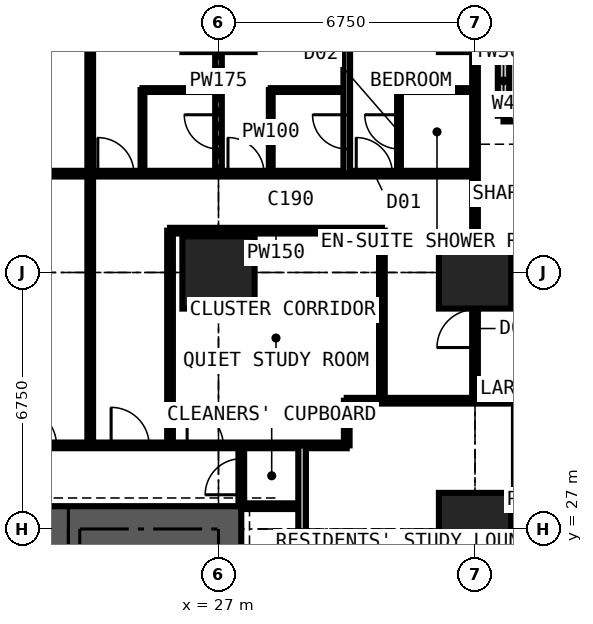
"""IFC4 building model, lengths in metres.
Left out: names, types, materials, properties, quantities, classifications, styles, units other than length and angle.
Written with IfcOpenShell. Run it as: python <this file> out.ifc"""

import sys

from ifc_helpers import new_model, si_unit, direction, frame, frame_2d, origin, origin_2d, place, context, subcontext, project, spatial, rectangle, extrude, element, fill, save


model = new_model("IFC4")
c1 = context("Model", 3, precision=1e-05, world=origin(), true_north=direction((0.0, 1.0)))
c2 = subcontext(c1, "Body", "Model", "MODEL_VIEW")
j1 = project(units=[si_unit("LENGTHUNIT", "METRE"), si_unit("PLANEANGLEUNIT", "RADIAN")], contexts=[c1])
p1 = place(None, origin())
s1 = spatial("IfcSite", under=j1, at=p1, CompositionType="ELEMENT")
p2 = place(p1, origin())
s2 = spatial("IfcBuilding", under=s1, at=p2, CompositionType="ELEMENT")
p3 = place(p2, frame((0.0, 0.0, 28.8)))
s3 = spatial("IfcBuildingStorey", under=s2, at=p3, CompositionType="ELEMENT", Elevation=28.8)
for number, where, z_axis, x_axis in (
    (1, (27.0, 33.75, 0.0), (0.0, 0.0, 1.0), (1.0, 0.0, 0.0)),
    (2, (33.75, 27.0, 0.0), (0.0, 0.0, 1.0), (1.0, 0.0, 0.0)),
    (3, (33.75, 33.75, 0.0), (0.0, 0.0, 1.0), (1.0, 0.0, 0.0)),
):
    element("IfcColumn", number, at=place(p3, frame(where, z_axis=z_axis, x_axis=x_axis)), inside=s3, PredefinedType="COLUMN", context=c2, shape_type="SweptSolid", body=[
        extrude(rectangle(XDim=1.9, YDim=1.9, at=origin_2d()), origin(), (0.0, 0.0, 1.0), 3.6),
    ])
p4 = place(p3, frame((27.6, 27.0, 0.0), z_axis=(0.0, 0.0, 1.0), x_axis=(-1.0, 0.0, 0.0)))
e4 = element("IfcWall", 4, at=p4, inside=s3, PredefinedType="SHEAR", context=c2, shape_type="SweptSolid", body=[
    extrude(rectangle(XDim=14.7, YDim=1.2, at=frame_2d((7.35, 0.0))), origin(), (0.0, 0.0, 1.0), 3.6),
])
p5 = place(p4, frame((4.55, 0.0, 0.0)))
e5 = element("IfcOpeningElement", 5, at=p5, cuts=e4, PredefinedType="OPENING", context=c2, shape_type="SweptSolid", body=[
    extrude(rectangle(XDim=0.9, YDim=2.2, at=frame_2d((0.45, 1.1))), frame((0.0, 0.61, 0.0), z_axis=(0.0, -1.0, 0.0), x_axis=(1.0, 0.0, 0.0)), (0.0, 0.0, 1.0), 1.22),
])
p6 = place(p4, frame((7.525, 0.0, 0.0)))
e6 = element("IfcOpeningElement", 6, at=p6, cuts=e4, PredefinedType="OPENING", context=c2, shape_type="SweptSolid", body=[
    extrude(rectangle(XDim=1.0, YDim=2.2, at=frame_2d((0.5, 1.1))), frame((0.0, 0.61, 0.0), z_axis=(0.0, -1.0, 0.0), x_axis=(1.0, 0.0, 0.0)), (0.0, 0.0, 1.0), 1.22),
])
p7 = place(p3, frame((37.875, 37.875, 0.0), z_axis=(0.0, 0.0, 1.0), x_axis=(-1.0, 0.0, 0.0)))
e7 = element("IfcWall", 7, at=p7, inside=s3, PredefinedType="SOLIDWALL", context=c2, shape_type="SweptSolid", body=[
    extrude(rectangle(XDim=3.375, YDim=0.3, at=frame_2d((1.688, 0.0))), origin(), (0.0, 0.0, 1.0), 3.375),
])
p8 = place(p7, frame((0.788, 0.0, 0.6)))
e8 = element("IfcOpeningElement", 8, at=p8, cuts=e7, PredefinedType="OPENING", context=c2, shape_type="SweptSolid", body=[
    extrude(rectangle(XDim=1.8, YDim=2.1, at=frame_2d((0.9, 1.05))), frame((0.0, 0.16, 0.0), z_axis=(0.0, -1.0, 0.0), x_axis=(1.0, 0.0, 0.0)), (0.0, 0.0, 1.0), 0.32),
])
p9 = place(p3, frame((34.5, 37.875, 0.0), z_axis=(0.0, 0.0, 1.0), x_axis=(0.0, 1.0, 0.0)))
e9 = element("IfcWall", 9, at=p9, inside=s3, PredefinedType="SOLIDWALL", context=c2, shape_type="SweptSolid", body=[
    extrude(rectangle(XDim=3.375, YDim=0.3, at=frame_2d((1.688, 0.0))), origin(), (0.0, 0.0, 1.0), 3.375),
])
p10 = place(p9, frame((0.317, 0.0, 0.9)))
e10 = element("IfcOpeningElement", 10, at=p10, cuts=e9, PredefinedType="OPENING", context=c2, shape_type="SweptSolid", body=[
    extrude(rectangle(XDim=1.2, YDim=1.8, at=frame_2d((0.6, 0.9))), frame((0.0, 0.16, 0.0), z_axis=(0.0, -1.0, 0.0), x_axis=(1.0, 0.0, 0.0)), (0.0, 0.0, 1.0), 0.32),
])
p11 = place(p3, frame((10.125, 36.35, 0.0), z_axis=(0.0, 0.0, 1.0), x_axis=(1.0, 0.0, 0.0)))
e11 = element("IfcWall", 11, at=p11, inside=s3, PredefinedType="PARTITIONING", context=c2, shape_type="SweptSolid", body=[
    extrude(rectangle(XDim=23.625, YDim=0.15, at=frame_2d((11.812, 0.0))), origin(), (0.0, 0.0, 1.0), 3.375),
])
p12 = place(p11, frame((20.5, 0.0, 0.0)))
e12 = element("IfcOpeningElement", 12, at=p12, cuts=e11, PredefinedType="OPENING", context=c2, shape_type="SweptSolid", body=[
    extrude(rectangle(XDim=0.95, YDim=2.2, at=frame_2d((0.475, 1.1))), frame((0.0, 0.085, 0.0), z_axis=(0.0, -1.0, 0.0), x_axis=(1.0, 0.0, 0.0)), (0.0, 0.0, 1.0), 0.17),
])
p13 = place(p11, frame((17.125, 0.0, 0.0)))
e13 = element("IfcOpeningElement", 13, at=p13, cuts=e11, PredefinedType="OPENING", context=c2, shape_type="SweptSolid", body=[
    extrude(rectangle(XDim=0.95, YDim=2.2, at=frame_2d((0.475, 1.1))), frame((0.0, 0.085, 0.0), z_axis=(0.0, -1.0, 0.0), x_axis=(1.0, 0.0, 0.0)), (0.0, 0.0, 1.0), 0.17),
])
p14 = place(p11, frame((13.7, 0.0, 0.0)))
e14 = element("IfcOpeningElement", 14, at=p14, cuts=e11, PredefinedType="OPENING", context=c2, shape_type="SweptSolid", body=[
    extrude(rectangle(XDim=0.95, YDim=2.2, at=frame_2d((0.475, 1.1))), frame((0.0, 0.085, 0.0), z_axis=(0.0, -1.0, 0.0), x_axis=(1.0, 0.0, 0.0)), (0.0, 0.0, 1.0), 0.17),
])
p15 = place(p11, frame((4.2, 0.0, 0.0)))
e15 = element("IfcOpeningElement", 15, at=p15, cuts=e11, PredefinedType="OPENING", context=c2, shape_type="SweptSolid", body=[
    extrude(rectangle(XDim=0.95, YDim=2.2, at=frame_2d((0.475, 1.1))), frame((0.0, 0.085, 0.0), z_axis=(0.0, -1.0, 0.0), x_axis=(1.0, 0.0, 0.0)), (0.0, 0.0, 1.0), 0.17),
])
p16 = place(p11, frame((10.95, 0.0, 0.0)))
e16 = element("IfcOpeningElement", 16, at=p16, cuts=e11, PredefinedType="OPENING", context=c2, shape_type="SweptSolid", body=[
    extrude(rectangle(XDim=0.95, YDim=2.2, at=frame_2d((0.475, 1.1))), frame((0.0, 0.085, 0.0), z_axis=(0.0, -1.0, 0.0), x_axis=(1.0, 0.0, 0.0)), (0.0, 0.0, 1.0), 0.17),
])
p17 = place(p3, frame((11.3, 29.2, 0.0), z_axis=(0.0, 0.0, 1.0), x_axis=(1.0, 0.0, 0.0)))
e17 = element("IfcWall", 17, at=p17, inside=s3, PredefinedType="PARTITIONING", context=c2, shape_type="SweptSolid", body=[
    extrude(rectangle(XDim=19.075, YDim=0.15, at=frame_2d((9.538, 0.0))), origin(), (0.0, 0.0, 1.0), 3.375),
])
p18 = place(p17, frame((12.875, 0.0, 0.0)))
e18 = element("IfcOpeningElement", 18, at=p18, cuts=e17, PredefinedType="OPENING", context=c2, shape_type="SweptSolid", body=[
    extrude(rectangle(XDim=1.0, YDim=2.2, at=frame_2d((0.5, 1.1))), frame((0.0, 0.085, 0.0), z_axis=(0.0, -1.0, 0.0), x_axis=(1.0, 0.0, 0.0)), (0.0, 0.0, 1.0), 0.17),
])
p19 = place(p17, frame((10.438, 0.0, 0.0)))
e19 = element("IfcOpeningElement", 19, at=p19, cuts=e17, PredefinedType="OPENING", context=c2, shape_type="SweptSolid", body=[
    extrude(rectangle(XDim=1.0, YDim=2.2, at=frame_2d((0.5, 1.1))), frame((0.0, 0.085, 0.0), z_axis=(0.0, -1.0, 0.0), x_axis=(1.0, 0.0, 0.0)), (0.0, 0.0, 1.0), 0.17),
])
p20 = place(p17, frame((14.875, 0.0, 0.0)))
e20 = element("IfcOpeningElement", 20, at=p20, cuts=e17, PredefinedType="OPENING", context=c2, shape_type="SweptSolid", body=[
    extrude(rectangle(XDim=0.95, YDim=2.2, at=frame_2d((0.475, 1.1))), frame((0.0, 0.085, 0.0), z_axis=(0.0, -1.0, 0.0), x_axis=(1.0, 0.0, 0.0)), (0.0, 0.0, 1.0), 0.17),
])
p21 = place(p3, frame((23.625, 29.2, 0.0), z_axis=(0.0, 0.0, 1.0), x_axis=(0.0, 1.0, 0.0)))
e21 = element("IfcWall", 21, at=p21, inside=s3, PredefinedType="PARTITIONING", context=c2, shape_type="SweptSolid", body=[
    extrude(rectangle(XDim=12.034, YDim=0.15, at=frame_2d((6.017, 0.0))), origin(), (0.0, 0.0, 1.0), 3.375),
])
p22 = place(p3, frame((25.0, 36.35, 0.0), z_axis=(0.0, 0.0, 1.0), x_axis=(0.0, 1.0, 0.0)))
e22 = element("IfcWall", 22, at=p22, inside=s3, PredefinedType="PARTITIONING", context=c2, shape_type="SweptSolid", body=[
    extrude(rectangle(XDim=2.2, YDim=0.1, at=frame_2d((1.1, 0.0))), origin(), (0.0, 0.0, 1.0), 3.375),
])
p23 = place(p3, frame((25.0, 38.55, 0.0), z_axis=(0.0, 0.0, 1.0), x_axis=(1.0, 0.0, 0.0)))
e23 = element("IfcWall", 23, at=p23, inside=s3, PredefinedType="PARTITIONING", context=c2, shape_type="SweptSolid", body=[
    extrude(rectangle(XDim=2.0, YDim=0.1, at=frame_2d((1.0, 0.0))), origin(), (0.0, 0.0, 1.0), 3.375),
])
p24 = place(p3, frame((25.725, 29.2, 0.0), z_axis=(0.0, 0.0, 1.0), x_axis=(0.0, 1.0, 0.0)))
e24 = element("IfcWall", 24, at=p24, inside=s3, PredefinedType="PARTITIONING", context=c2, shape_type="SweptSolid", body=[
    extrude(rectangle(XDim=5.65, YDim=0.15, at=frame_2d((2.825, 0.0))), origin(), (0.0, 0.0, 1.0), 3.375),
])
p25 = place(p3, frame((25.725, 34.85, 0.0), z_axis=(0.0, 0.0, 1.0), x_axis=(1.0, 0.0, 0.0)))
e25 = element("IfcWall", 25, at=p25, inside=s3, PredefinedType="PARTITIONING", context=c2, shape_type="SweptSolid", body=[
    extrude(rectangle(XDim=5.575, YDim=0.15, at=frame_2d((2.788, 0.0))), origin(), (0.0, 0.0, 1.0), 3.375),
])
p26 = place(p3, frame((27.0, 36.35, 0.0), z_axis=(0.0, 0.0, 1.0), x_axis=(0.0, 1.0, 0.0)))
e26 = element("IfcWall", 26, at=p26, inside=s3, PredefinedType="PARTITIONING", context=c2, shape_type="SweptSolid", body=[
    extrude(rectangle(XDim=4.884, YDim=0.175, at=frame_2d((2.442, 0.0))), origin(), (0.0, 0.0, 1.0), 2.877),
])
p27 = place(p26, frame((0.65, 0.0, 0.0)))
e27 = element("IfcOpeningElement", 27, at=p27, cuts=e26, PredefinedType="OPENING", context=c2, shape_type="SweptSolid", body=[
    extrude(rectangle(XDim=0.9, YDim=2.2, at=frame_2d((0.45, 1.1))), frame((0.0, 0.097, 0.0), z_axis=(0.0, -1.0, 0.0), x_axis=(1.0, 0.0, 0.0)), (0.0, 0.0, 1.0), 0.195),
])
p28 = place(p3, frame((27.6, 27.6, 0.0), z_axis=(0.0, 0.0, 1.0), x_axis=(0.0, 1.0, 0.0)))
e28 = element("IfcWall", 28, at=p28, inside=s3, PredefinedType="PARTITIONING", context=c2, shape_type="SweptSolid", body=[
    extrude(rectangle(XDim=1.6, YDim=0.15, at=frame_2d((0.8, 0.0))), origin(), (0.0, 0.0, 1.0), 3.375),
])
p29 = place(p28, frame((0.3, 0.0, 0.0)))
e29 = element("IfcOpeningElement", 29, at=p29, cuts=e28, PredefinedType="OPENING", context=c2, shape_type="SweptSolid", body=[
    extrude(rectangle(XDim=0.95, YDim=2.2, at=frame_2d((0.475, 1.1))), frame((0.0, 0.085, 0.0), z_axis=(0.0, -1.0, 0.0), x_axis=(1.0, 0.0, 0.0)), (0.0, 0.0, 1.0), 0.17),
])
p30 = place(p3, frame((27.6, 27.6, 0.0), z_axis=(0.0, 0.0, 1.0), x_axis=(1.0, 0.0, 0.0)))
e30 = element("IfcWall", 30, at=p30, inside=s3, PredefinedType="PARTITIONING", context=c2, shape_type="SweptSolid", body=[
    extrude(rectangle(XDim=1.6, YDim=0.15, at=frame_2d((0.8, 0.0))), origin(), (0.0, 0.0, 1.0), 2.877),
])
p31 = place(p3, frame((28.375, 36.35, 0.0), z_axis=(0.0, 0.0, 1.0), x_axis=(0.0, 1.0, 0.0)))
e31 = element("IfcWall", 31, at=p31, inside=s3, PredefinedType="PARTITIONING", context=c2, shape_type="SweptSolid", body=[
    extrude(rectangle(XDim=2.2, YDim=0.1, at=frame_2d((1.1, 0.0))), origin(), (0.0, 0.0, 1.0), 3.375),
])
p32 = place(p3, frame((28.375, 38.55, 0.0), z_axis=(0.0, 0.0, 1.0), x_axis=(1.0, 0.0, 0.0)))
e32 = element("IfcWall", 32, at=p32, inside=s3, PredefinedType="PARTITIONING", context=c2, shape_type="SweptSolid", body=[
    extrude(rectangle(XDim=2.0, YDim=0.1, at=frame_2d((1.0, 0.0))), origin(), (0.0, 0.0, 1.0), 3.375),
])
p33 = place(p3, frame((29.2, 11.3, 0.0), z_axis=(0.0, 0.0, 1.0), x_axis=(0.0, 1.0, 0.0)))
e33 = element("IfcWall", 33, at=p33, inside=s3, PredefinedType="PARTITIONING", context=c2, shape_type="SweptSolid", body=[
    extrude(rectangle(XDim=17.9, YDim=0.2, at=frame_2d((8.95, 0.0))), origin(), (0.0, 0.0, 1.0), 3.375),
])
p34 = place(p33, frame((8.35, 0.0, 0.0)))
e34 = element("IfcOpeningElement", 34, at=p34, cuts=e33, PredefinedType="OPENING", context=c2, shape_type="SweptSolid", body=[
    extrude(rectangle(XDim=1.2, YDim=2.2, at=frame_2d((0.6, 1.1))), frame((0.0, 0.11, 0.0), z_axis=(0.0, -1.0, 0.0), x_axis=(1.0, 0.0, 0.0)), (0.0, 0.0, 1.0), 0.22),
])
p35 = place(p3, frame((30.375, 29.2, 0.0), z_axis=(0.0, 0.0, 1.0), x_axis=(0.0, 1.0, 0.0)))
e35 = element("IfcWall", 35, at=p35, inside=s3, PredefinedType="PARTITIONING", context=c2, shape_type="SweptSolid", body=[
    extrude(rectangle(XDim=1.175, YDim=0.15, at=frame_2d((0.587, 0.0))), origin(), (0.0, 0.0, 1.0), 3.375),
])
p36 = place(p3, frame((30.375, 30.375, 0.0), z_axis=(0.0, 0.0, 1.0), x_axis=(1.0, 0.0, 0.0)))
e36 = element("IfcWall", 36, at=p36, inside=s3, PredefinedType="PARTITIONING", context=c2, shape_type="SweptSolid", body=[
    extrude(rectangle(XDim=10.859, YDim=0.15, at=frame_2d((5.429, 0.0))), origin(), (0.0, 0.0, 1.0), 3.375),
])
p37 = place(p3, frame((30.375, 36.35, 0.0), z_axis=(0.0, 0.0, 1.0), x_axis=(0.0, 1.0, 0.0)))
e37 = element("IfcWall", 37, at=p37, inside=s3, PredefinedType="PARTITIONING", context=c2, shape_type="SweptSolid", body=[
    extrude(rectangle(XDim=4.884, YDim=0.175, at=frame_2d((2.442, 0.0))), origin(), (0.0, 0.0, 1.0), 3.375),
])
p38 = place(p37, frame((0.65, 0.0, 0.0)))
e38 = element("IfcOpeningElement", 38, at=p38, cuts=e37, PredefinedType="OPENING", context=c2, shape_type="SweptSolid", body=[
    extrude(rectangle(XDim=0.9, YDim=2.2, at=frame_2d((0.45, 1.1))), frame((0.0, 0.097, 0.0), z_axis=(0.0, -1.0, 0.0), x_axis=(1.0, 0.0, 0.0)), (0.0, 0.0, 1.0), 0.195),
])
p39 = place(p3, frame((31.3, 30.375, 0.0), z_axis=(0.0, 0.0, 1.0), x_axis=(0.0, 1.0, 0.0)))
e39 = element("IfcWall", 39, at=p39, inside=s3, PredefinedType="PARTITIONING", context=c2, shape_type="SweptSolid", body=[
    extrude(rectangle(XDim=4.475, YDim=0.15, at=frame_2d((2.238, 0.0))), origin(), (0.0, 0.0, 1.0), 3.375),
])
p40 = place(p3, frame((31.75, 36.35, 0.0), z_axis=(0.0, 0.0, 1.0), x_axis=(0.0, 1.0, 0.0)))
e40 = element("IfcWall", 40, at=p40, inside=s3, PredefinedType="PARTITIONING", context=c2, shape_type="SweptSolid", body=[
    extrude(rectangle(XDim=2.2, YDim=0.1, at=frame_2d((1.1, 0.0))), origin(), (0.0, 0.0, 1.0), 3.375),
])
p41 = place(p40, frame((0.65, 0.0, 0.0)))
e41 = element("IfcOpeningElement", 41, at=p41, cuts=e40, PredefinedType="OPENING", context=c2, shape_type="SweptSolid", body=[
    extrude(rectangle(XDim=0.9, YDim=2.2, at=frame_2d((0.45, 1.1))), frame((0.0, 0.06, 0.0), z_axis=(0.0, -1.0, 0.0), x_axis=(1.0, 0.0, 0.0)), (0.0, 0.0, 1.0), 0.12),
])
p42 = place(p3, frame((31.75, 38.55, 0.0), z_axis=(0.0, 0.0, 1.0), x_axis=(1.0, 0.0, 0.0)))
e42 = element("IfcWall", 42, at=p42, inside=s3, PredefinedType="PARTITIONING", context=c2, shape_type="SweptSolid", body=[
    extrude(rectangle(XDim=2.0, YDim=0.1, at=frame_2d((1.0, 0.0))), origin(), (0.0, 0.0, 1.0), 3.375),
])
p43 = place(p3, frame((33.75, 30.375, 0.0), z_axis=(0.0, 0.0, 1.0), x_axis=(0.0, 1.0, 0.0)))
e43 = element("IfcWall", 43, at=p43, inside=s3, PredefinedType="PARTITIONING", context=c2, shape_type="SweptSolid", body=[
    extrude(rectangle(XDim=10.859, YDim=0.15, at=frame_2d((5.429, 0.0))), origin(), (0.0, 0.0, 1.0), 2.877),
])
p44 = place(p43, frame((1.4, 0.0, 0.0)))
e44 = element("IfcOpeningElement", 44, at=p44, cuts=e43, PredefinedType="OPENING", context=c2, shape_type="SweptSolid", body=[
    extrude(rectangle(XDim=1.0, YDim=2.2, at=frame_2d((0.5, 1.1))), frame((0.0, 0.085, 0.0), z_axis=(0.0, -1.0, 0.0), x_axis=(1.0, 0.0, 0.0)), (0.0, 0.0, 1.0), 0.17),
])
p45 = place(p10, origin())
e45 = element("IfcWindow", 45, at=p45, inside=s3, PartitioningType="SINGLE_PANEL", PredefinedType="WINDOW", context=c2, shape_type="SweptSolid", body=[
    extrude(rectangle(XDim=1.2, YDim=1.8, at=frame_2d((0.6, 0.9))), frame((0.0, 0.03, 0.0), z_axis=(0.0, -1.0, 0.0), x_axis=(1.0, 0.0, 0.0)), (0.0, 0.0, 1.0), 0.06),
])
fill(e10, e45)
p46 = place(p5, origin())
e46 = element("IfcDoor", 46, at=p46, inside=s3, OperationType="SINGLE_SWING_LEFT", PredefinedType="DOOR", context=c2, shape_type="SweptSolid", body=[
    extrude(rectangle(XDim=0.9, YDim=2.2, at=frame_2d((0.45, 1.1))), frame((0.0, 0.4, 0.0), z_axis=(0.0, -1.0, 0.0), x_axis=(1.0, 0.0, 0.0)), (0.0, 0.0, 1.0), 0.8),
])
fill(e5, e46)
p47 = place(p29, origin())
e47 = element("IfcDoor", 47, at=p47, inside=s3, OperationType="SINGLE_SWING_LEFT", PredefinedType="DOOR", context=c2, shape_type="SweptSolid", body=[
    extrude(rectangle(XDim=0.95, YDim=2.2, at=frame_2d((0.475, 1.1))), frame((0.0, 0.025, 0.0), z_axis=(0.0, -1.0, 0.0), x_axis=(1.0, 0.0, 0.0)), (0.0, 0.0, 1.0), 0.05),
])
fill(e29, e47)
p48 = place(p44, origin())
e48 = element("IfcDoor", 48, at=p48, inside=s3, OperationType="SINGLE_SWING_LEFT", PredefinedType="DOOR", context=c2, shape_type="SweptSolid", body=[
    extrude(rectangle(XDim=1.0, YDim=2.2, at=frame_2d((0.5, 1.1))), frame((0.0, 0.025, 0.0), z_axis=(0.0, -1.0, 0.0), x_axis=(1.0, 0.0, 0.0)), (0.0, 0.0, 1.0), 0.05),
])
fill(e44, e48)
p49 = place(p12, origin())
e49 = element("IfcDoor", 49, at=p49, inside=s3, OperationType="SINGLE_SWING_LEFT", PredefinedType="DOOR", context=c2, shape_type="SweptSolid", body=[
    extrude(rectangle(XDim=0.95, YDim=2.2, at=frame_2d((0.475, 1.1))), frame((0.0, 0.025, 0.0), z_axis=(0.0, -1.0, 0.0), x_axis=(1.0, 0.0, 0.0)), (0.0, 0.0, 1.0), 0.05),
])
fill(e12, e49)
p50 = place(p41, origin())
e50 = element("IfcDoor", 50, at=p50, inside=s3, OperationType="SINGLE_SWING_RIGHT", PredefinedType="DOOR", context=c2, shape_type="SweptSolid", body=[
    extrude(rectangle(XDim=0.9, YDim=2.2, at=frame_2d((0.45, 1.1))), frame((0.0, 0.025, 0.0), z_axis=(0.0, -1.0, 0.0), x_axis=(1.0, 0.0, 0.0)), (0.0, 0.0, 1.0), 0.05),
])
fill(e41, e50)
p51 = place(p13, origin())
e51 = element("IfcDoor", 51, at=p51, inside=s3, OperationType="SINGLE_SWING_LEFT", PredefinedType="DOOR", context=c2, shape_type="SweptSolid", body=[
    extrude(rectangle(XDim=0.95, YDim=2.2, at=frame_2d((0.475, 1.1))), frame((0.0, 0.025, 0.0), z_axis=(0.0, -1.0, 0.0), x_axis=(1.0, 0.0, 0.0)), (0.0, 0.0, 1.0), 0.05),
])
fill(e13, e51)
p52 = place(p38, origin())
e52 = element("IfcDoor", 52, at=p52, inside=s3, OperationType="SINGLE_SWING_RIGHT", PredefinedType="DOOR", context=c2, shape_type="SweptSolid", body=[
    extrude(rectangle(XDim=0.9, YDim=2.2, at=frame_2d((0.45, 1.1))), frame((0.0, 0.025, 0.0), z_axis=(0.0, -1.0, 0.0), x_axis=(1.0, 0.0, 0.0)), (0.0, 0.0, 1.0), 0.05),
])
fill(e38, e52)
p53 = place(p14, origin())
e53 = element("IfcDoor", 53, at=p53, inside=s3, OperationType="SINGLE_SWING_LEFT", PredefinedType="DOOR", context=c2, shape_type="SweptSolid", body=[
    extrude(rectangle(XDim=0.95, YDim=2.2, at=frame_2d((0.475, 1.1))), frame((0.0, 0.025, 0.0), z_axis=(0.0, -1.0, 0.0), x_axis=(1.0, 0.0, 0.0)), (0.0, 0.0, 1.0), 0.05),
])
fill(e14, e53)
p54 = place(p27, origin())
e54 = element("IfcDoor", 54, at=p54, inside=s3, OperationType="SINGLE_SWING_RIGHT", PredefinedType="DOOR", context=c2, shape_type="SweptSolid", body=[
    extrude(rectangle(XDim=0.9, YDim=2.2, at=frame_2d((0.45, 1.1))), frame((0.0, 0.025, 0.0), z_axis=(0.0, -1.0, 0.0), x_axis=(1.0, 0.0, 0.0)), (0.0, 0.0, 1.0), 0.05),
])
fill(e27, e54)
p55 = place(p18, origin())
e55 = element("IfcDoor", 55, at=p55, inside=s3, OperationType="SINGLE_SWING_LEFT", PredefinedType="DOOR", context=c2, shape_type="SweptSolid", body=[
    extrude(rectangle(XDim=1.0, YDim=2.2, at=frame_2d((0.5, 1.1))), frame((0.0, 0.025, 0.0), z_axis=(0.0, -1.0, 0.0), x_axis=(1.0, 0.0, 0.0)), (0.0, 0.0, 1.0), 0.05),
])
fill(e18, e55)
p56 = place(p19, origin())
e56 = element("IfcDoor", 56, at=p56, inside=s3, OperationType="SINGLE_SWING_LEFT", PredefinedType="DOOR", context=c2, shape_type="SweptSolid", body=[
    extrude(rectangle(XDim=1.0, YDim=2.2, at=frame_2d((0.5, 1.1))), frame((0.0, 0.025, 0.0), z_axis=(0.0, -1.0, 0.0), x_axis=(1.0, 0.0, 0.0)), (0.0, 0.0, 1.0), 0.05),
])
fill(e19, e56)
p57 = place(p20, origin())
e57 = element("IfcDoor", 57, at=p57, inside=s3, OperationType="SINGLE_SWING_LEFT", PredefinedType="DOOR", context=c2, shape_type="SweptSolid", body=[
    extrude(rectangle(XDim=0.95, YDim=2.2, at=frame_2d((0.475, 1.1))), frame((0.0, 0.025, 0.0), z_axis=(0.0, -1.0, 0.0), x_axis=(1.0, 0.0, 0.0)), (0.0, 0.0, 1.0), 0.05),
])
fill(e20, e57)
save(model, sys.argv[1])
